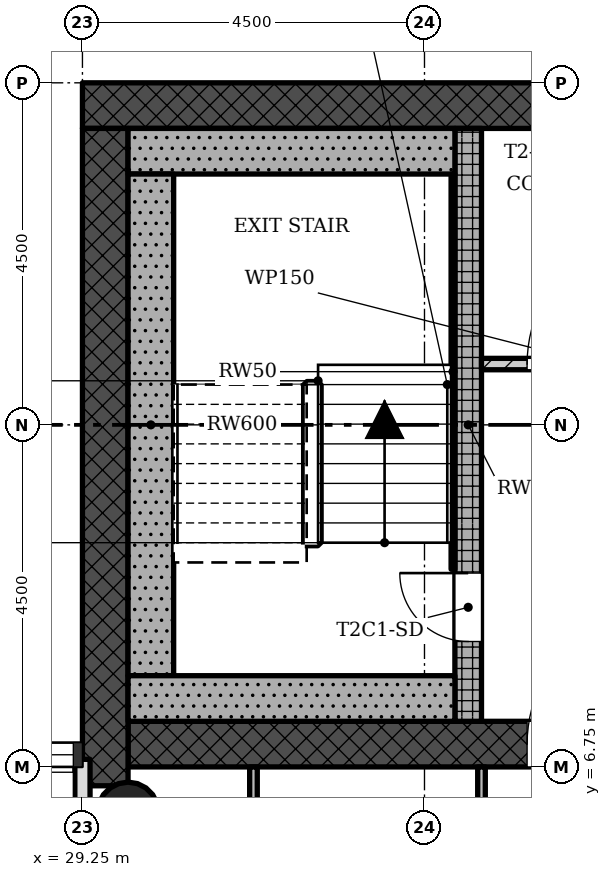
"""IFC4 building model, lengths in metres.
Left out: names, types, materials, properties, quantities, classifications, styles, units other than length and angle.
Written with IfcOpenShell. Run it as: python <this file> out.ifc"""

import sys

from ifc_helpers import new_model, si_unit, direction, frame, frame_2d, origin, origin_2d, place, context, subcontext, project, spatial, rectangle, hollow_circle, extrude, element, fill, save


model = new_model("IFC4")
c1 = context("Model", 3, precision=1e-05, world=origin(), true_north=direction((0.0, 1.0)))
c2 = subcontext(c1, "Body", "Model", "MODEL_VIEW")
j1 = project(units=[si_unit("LENGTHUNIT", "METRE"), si_unit("PLANEANGLEUNIT", "RADIAN")], contexts=[c1])
p1 = place(None, origin())
s1 = spatial("IfcSite", under=j1, at=p1, CompositionType="ELEMENT")
p2 = place(p1, origin())
s2 = spatial("IfcBuilding", under=s1, at=p2, CompositionType="ELEMENT")
p3 = place(p2, frame((0.0, 0.0, 216.4)))
s3 = spatial("IfcBuildingStorey", under=s2, at=p3, CompositionType="ELEMENT", Elevation=216.4)
p4 = place(p3, frame((29.85, 7.05, 0.0), z_axis=(0.0, 0.0, 1.0), x_axis=(1.0, 0.0, 0.0)))
e1 = element("IfcWall", 1, at=p4, inside=s3, PredefinedType="SHEAR", context=c2, shape_type="SweptSolid", body=[
    extrude(rectangle(XDim=12.9, YDim=0.6, at=frame_2d((6.45, 0.0))), origin(), (0.0, 0.0, 1.0), 3.4),
])
p5 = place(p4, frame((5.25, 0.0, 0.0)))
e2 = element("IfcOpeningElement", 2, at=p5, cuts=e1, PredefinedType="OPENING", context=c2, shape_type="SweptSolid", body=[
    extrude(rectangle(XDim=1.8, YDim=2.1, at=frame_2d((0.9, 1.05))), frame((0.0, 0.31, 0.0), z_axis=(0.0, -1.0, 0.0), x_axis=(1.0, 0.0, 0.0)), (0.0, 0.0, 1.0), 0.62),
])
p6 = place(p3, frame((42.15, 15.45, 0.0), z_axis=(0.0, 0.0, 1.0), x_axis=(-1.0, 0.0, 0.0)))
e3 = element("IfcWall", 3, at=p6, inside=s3, PredefinedType="SHEAR", context=c2, shape_type="SweptSolid", body=[
    extrude(rectangle(XDim=12.9, YDim=0.6, at=frame_2d((6.45, 0.0))), origin(), (0.0, 0.0, 1.0), 3.4),
])
p7 = place(p6, frame((5.7, 0.0, 0.45)))
e4 = element("IfcOpeningElement", 4, at=p7, cuts=e3, PredefinedType="OPENING", context=c2, shape_type="SweptSolid", body=[
    extrude(rectangle(XDim=0.9, YDim=2.4, at=frame_2d((0.45, 1.2))), frame((0.0, 0.31, 0.0), z_axis=(0.0, -1.0, 0.0), x_axis=(1.0, 0.0, 0.0)), (0.0, 0.0, 1.0), 0.62),
])
p8 = place(p3, frame((29.55, 15.15, 0.0), z_axis=(0.0, 0.0, 1.0), x_axis=(0.0, -1.0, 0.0)))
e5 = element("IfcWall", 5, at=p8, inside=s3, PredefinedType="SHEAR", context=c2, shape_type="SweptSolid", body=[
    extrude(rectangle(XDim=8.648, YDim=0.6, at=frame_2d((4.324, 0.0))), origin(), (0.0, 0.0, 1.0), 3.4),
])
p9 = place(p3, frame((34.325, 7.35, 0.0), z_axis=(0.0, 0.0, 1.0), x_axis=(0.0, 1.0, 0.0)))
e6 = element("IfcWall", 6, at=p9, inside=s3, PredefinedType="SHEAR", context=c2, shape_type="SweptSolid", body=[
    extrude(rectangle(XDim=7.8, YDim=0.35, at=frame_2d((3.9, 0.0))), origin(), (0.0, 0.0, 1.0), 3.4),
])
p10 = place(p9, frame((1.05, 0.0, 0.0)))
e7 = element("IfcOpeningElement", 7, at=p10, cuts=e6, PredefinedType="OPENING", context=c2, shape_type="SweptSolid", body=[
    extrude(rectangle(XDim=0.9, YDim=2.1, at=frame_2d((0.45, 1.05))), frame((0.0, 0.185, 0.0), z_axis=(0.0, -1.0, 0.0), x_axis=(1.0, 0.0, 0.0)), (0.0, 0.0, 1.0), 0.37),
])
p11 = place(p3, frame((29.85, 6.15, 0.0), z_axis=(0.0, 0.0, 1.0), x_axis=(1.0, 0.0, 0.0)))
e8 = element("IfcColumn", 8, at=p11, inside=s3, PredefinedType="COLUMN", context=c2, shape_type="SweptSolid", body=[
    extrude(hollow_circle(Radius=0.4, WallThickness=0.028, at=origin_2d()), origin(), (0.0, 0.0, 1.0), 3.4),
])
p12 = place(p3, frame((37.5, 12.05, 0.0), z_axis=(0.0, 0.0, 1.0), x_axis=(-1.0, 0.0, 0.0)))
e9 = element("IfcWall", 9, at=p12, inside=s3, PredefinedType="PARTITIONING", context=c2, shape_type="SweptSolid", body=[
    extrude(rectangle(XDim=3.0, YDim=0.15, at=frame_2d((1.5, 0.0))), origin(), (0.0, 0.0, 1.0), 3.0),
])
p13 = place(p12, frame((0.6, 0.0, 0.0)))
e10 = element("IfcOpeningElement", 10, at=p13, cuts=e9, PredefinedType="OPENING", context=c2, shape_type="SweptSolid", body=[
    extrude(rectangle(XDim=1.8, YDim=2.1, at=frame_2d((0.9, 1.05))), frame((0.0, 0.085, 0.0), z_axis=(0.0, -1.0, 0.0), x_axis=(1.0, 0.0, 0.0)), (0.0, 0.0, 1.0), 0.17),
])
p14 = place(p3, frame((34.5, 4.5, 0.0), z_axis=(0.0, 0.0, 1.0), x_axis=(0.0, 1.0, 0.0)))
e11 = element("IfcWall", 11, at=p14, inside=s3, PredefinedType="PARTITIONING", context=c2, shape_type="SweptSolid", body=[
    extrude(rectangle(XDim=2.25, YDim=0.1, at=frame_2d((1.125, 0.0))), origin(), (0.0, 0.0, 1.0), 3.0),
])
p15 = place(p3, frame((31.5, 0.9, 0.0), z_axis=(0.0, 0.0, 1.0), x_axis=(0.0, 1.0, 0.0)))
e12 = element("IfcWall", 12, at=p15, inside=s3, PredefinedType="PARTITIONING", context=c2, shape_type="SweptSolid", body=[
    extrude(rectangle(XDim=5.85, YDim=0.1, at=frame_2d((2.925, 0.0))), origin(), (0.0, 0.0, 1.0), 3.0),
])
p16 = place(p15, frame((1.35, 0.0, 0.0)))
e13 = element("IfcOpeningElement", 13, at=p16, cuts=e12, PredefinedType="OPENING", context=c2, shape_type="SweptSolid", body=[
    extrude(rectangle(XDim=0.9, YDim=2.1, at=frame_2d((0.45, 1.05))), frame((0.0, 0.06, 0.0), z_axis=(0.0, -1.0, 0.0), x_axis=(1.0, 0.0, 0.0)), (0.0, 0.0, 1.0), 0.12),
])
p17 = place(p3, frame((29.25, -6.85, 0.0), z_axis=(0.0, 0.0, 1.0), x_axis=(0.0, 1.0, 0.0)))
e14 = element("IfcWall", 14, at=p17, inside=s3, PredefinedType="SOLIDWALL", context=c2, shape_type="SweptSolid", body=[
    extrude(rectangle(XDim=13.7, YDim=0.2, at=frame_2d((6.85, 0.0))), origin(), (0.0, 0.0, 1.0), 3.0),
])
p18 = place(p17, frame((6.4, 0.0, 0.0)))
e15 = element("IfcOpeningElement", 15, at=p18, cuts=e14, PredefinedType="OPENING", context=c2, shape_type="SweptSolid", body=[
    extrude(rectangle(XDim=0.9, YDim=2.1, at=frame_2d((0.45, 1.05))), frame((0.0, 0.11, 0.0), z_axis=(0.0, -1.0, 0.0), x_axis=(1.0, 0.0, 0.0)), (0.0, 0.0, 1.0), 0.22),
])
p19 = place(p3, frame((34.15, 14.85, 0.0), z_axis=(0.0, 0.0, 1.0), x_axis=(-1.0, 0.0, 0.0)))
e16 = element("IfcWall", 16, at=p19, inside=s3, PredefinedType="SHEAR", context=c2, shape_type="SweptSolid", body=[
    extrude(rectangle(XDim=4.3, YDim=0.6, at=frame_2d((2.15, 0.0))), origin(), (0.0, 0.0, 1.0), 3.4),
])
p20 = place(p3, frame((30.15, 7.95, 0.0), z_axis=(0.0, 0.0, 1.0), x_axis=(0.0, 1.0, 0.0)))
e17 = element("IfcWall", 17, at=p20, inside=s3, PredefinedType="SHEAR", context=c2, shape_type="SweptSolid", body=[
    extrude(rectangle(XDim=6.6, YDim=0.6, at=frame_2d((3.3, 0.0))), origin(), (0.0, 0.0, 1.0), 3.4),
])
p21 = place(p3, frame((34.15, 7.65, 0.0), z_axis=(0.0, 0.0, 1.0), x_axis=(-1.0, 0.0, 0.0)))
e18 = element("IfcWall", 18, at=p21, inside=s3, PredefinedType="SHEAR", context=c2, shape_type="SweptSolid", body=[
    extrude(rectangle(XDim=4.3, YDim=0.6, at=frame_2d((2.15, 0.0))), origin(), (0.0, 0.0, 1.0), 3.4),
])
p22 = place(p3, frame((34.125, 9.35, 0.0), z_axis=(0.0, 0.0, 1.0), x_axis=(0.0, 1.0, 0.0)))
e19 = element("IfcWall", 19, at=p22, inside=s3, PredefinedType="SHEAR", context=c2, shape_type="SweptSolid", body=[
    extrude(rectangle(XDim=5.2, YDim=0.05, at=frame_2d((2.6, 0.0))), origin(), (0.0, 0.0, 1.0), 3.4),
])
p23 = place(p13, origin())
e20 = element("IfcDoor", 20, at=p23, inside=s3, OperationType="SINGLE_SWING_LEFT", PredefinedType="DOOR", context=c2, shape_type="SweptSolid", body=[
    extrude(rectangle(XDim=1.8, YDim=2.1, at=frame_2d((0.9, 1.05))), frame((0.0, 0.025, 0.0), z_axis=(0.0, -1.0, 0.0), x_axis=(1.0, 0.0, 0.0)), (0.0, 0.0, 1.0), 0.05),
])
fill(e10, e20)
p24 = place(p10, origin())
e21 = element("IfcDoor", 21, at=p24, inside=s3, OperationType="SINGLE_SWING_LEFT", PredefinedType="DOOR", context=c2, shape_type="SweptSolid", body=[
    extrude(rectangle(XDim=0.9, YDim=2.1, at=frame_2d((0.45, 1.05))), frame((0.0, 0.025, 0.0), z_axis=(0.0, -1.0, 0.0), x_axis=(1.0, 0.0, 0.0)), (0.0, 0.0, 1.0), 0.05),
])
fill(e7, e21)
p25 = place(p5, origin())
e22 = element("IfcDoor", 22, at=p25, inside=s3, OperationType="SINGLE_SWING_LEFT", PredefinedType="DOOR", context=c2, shape_type="SweptSolid", body=[
    extrude(rectangle(XDim=1.8, YDim=2.1, at=frame_2d((0.9, 1.05))), frame((0.0, 0.025, 0.0), z_axis=(0.0, -1.0, 0.0), x_axis=(1.0, 0.0, 0.0)), (0.0, 0.0, 1.0), 0.05),
])
fill(e2, e22)
save(model, sys.argv[1])
